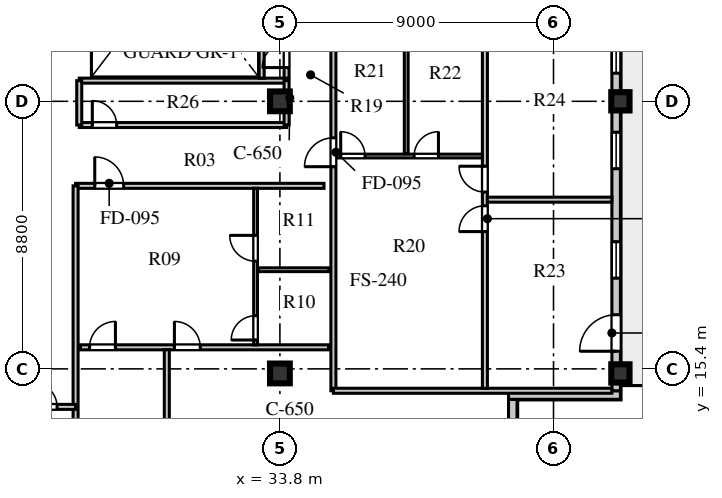
"""IFC4 building model, lengths in metres.
Left out: names, types, materials, properties, quantities, classifications, styles, units other than length and angle.
Written with IfcOpenShell. Run it as: python <this file> out.ifc"""

import sys

from ifc_helpers import new_model, si_unit, direction, frame, frame_2d, origin, origin_2d, place, context, subcontext, project, spatial, rectangle, extrude, element, fill, save


model = new_model("IFC4")
c1 = context("Model", 3, precision=1e-05, world=origin(), true_north=direction((0.0, 1.0)))
c2 = subcontext(c1, "Body", "Model", "MODEL_VIEW")
j1 = project(units=[si_unit("LENGTHUNIT", "METRE"), si_unit("PLANEANGLEUNIT", "RADIAN")], contexts=[c1])
p1 = place(None, origin())
s1 = spatial("IfcSite", under=j1, at=p1, CompositionType="ELEMENT")
p2 = place(p1, origin())
s2 = spatial("IfcBuilding", under=s1, at=p2, CompositionType="ELEMENT")
p3 = place(p2, frame((0.0, 0.0, 327.7)))
s3 = spatial("IfcBuildingStorey", under=s2, at=p3, CompositionType="ELEMENT", Elevation=327.7)
for number, where, z_axis, x_axis in (
    (1, (33.8, 15.25, 0.0), (0.0, 0.0, 1.0), (1.0, 0.0, 0.0)),
    (2, (33.8, 24.2, 0.0), (0.0, 0.0, 1.0), (1.0, 0.0, 0.0)),
):
    element("IfcColumn", number, at=place(p3, frame(where, z_axis=z_axis, x_axis=x_axis)), inside=s3, PredefinedType="COLUMN", context=c2, shape_type="SweptSolid", body=[
        extrude(rectangle(XDim=0.65, YDim=0.65, at=origin_2d()), origin(), (0.0, 0.0, 1.0), 3.56),
    ])
for number, where, z_axis, x_axis in (
    (3, (45.0, 15.25, 0.0), (0.0, 0.0, 1.0), (1.0, 0.0, 0.0)),
    (4, (45.0, 24.2, 0.0), (0.0, 0.0, 1.0), (1.0, 0.0, 0.0)),
):
    element("IfcColumn", number, at=place(p3, frame(where, z_axis=z_axis, x_axis=x_axis)), inside=s3, PredefinedType="COLUMN", context=c2, shape_type="SweptSolid", body=[
        extrude(rectangle(XDim=0.6, YDim=0.6, at=origin_2d()), origin(), (0.0, 0.0, 1.0), 3.56),
    ])
p4 = place(p3, frame((41.46, 11.28, 0.0), z_axis=(0.0, 0.0, 1.0), x_axis=(0.0, 1.0, 0.0)))
e5 = element("IfcWall", 5, at=p4, inside=s3, PredefinedType="STANDARD", context=c2, shape_type="SweptSolid", body=[
    extrude(rectangle(XDim=3.12, YDim=0.28, at=frame_2d((1.56, 0.0))), origin(), (0.0, 0.0, 1.0), 2.92),
])
p5 = place(p3, frame((41.32, 14.54, 0.0), z_axis=(0.0, 0.0, 1.0), x_axis=(1.0, 0.0, 0.0)))
e6 = element("IfcWall", 6, at=p5, inside=s3, PredefinedType="STANDARD", context=c2, shape_type="SweptSolid", body=[
    extrude(rectangle(XDim=3.68, YDim=0.28, at=frame_2d((1.84, 0.0))), origin(), (0.0, 0.0, 1.0), 2.92),
])
p6 = place(p3, frame((44.86, 14.68, 0.0), z_axis=(0.0, 0.0, 1.0), x_axis=(0.0, 1.0, 0.0)))
e7 = element("IfcWall", 7, at=p6, inside=s3, PredefinedType="STANDARD", context=c2, shape_type="SweptSolid", body=[
    extrude(rectangle(XDim=27.84, YDim=0.28, at=frame_2d((13.92, 0.0))), origin(), (0.0, 0.0, 1.0), 2.92),
])
p7 = place(p6, frame((1.3, 0.0, 0.0)))
e8 = element("IfcOpeningElement", 8, at=p7, cuts=e7, PredefinedType="OPENING", context=c2, shape_type="SweptSolid", body=[
    extrude(rectangle(XDim=1.2, YDim=2.05, at=frame_2d((0.6, 1.025))), frame((0.0, 0.15, 0.0), z_axis=(0.0, -1.0, 0.0), x_axis=(1.0, 0.0, 0.0)), (0.0, 0.0, 1.0), 0.3),
])
p8 = place(p6, frame((3.703, 0.0, 0.8)))
e9 = element("IfcOpeningElement", 9, at=p8, cuts=e7, PredefinedType="OPENING", context=c2, shape_type="SweptSolid", body=[
    extrude(rectangle(XDim=1.2, YDim=1.75, at=frame_2d((0.6, 0.875))), frame((0.0, 0.15, 0.0), z_axis=(0.0, -1.0, 0.0), x_axis=(1.0, 0.0, 0.0)), (0.0, 0.0, 1.0), 0.3),
])
p9 = place(p6, frame((7.303, 0.0, 0.8)))
e10 = element("IfcOpeningElement", 10, at=p9, cuts=e7, PredefinedType="OPENING", context=c2, shape_type="SweptSolid", body=[
    extrude(rectangle(XDim=1.2, YDim=1.75, at=frame_2d((0.6, 0.875))), frame((0.0, 0.15, 0.0), z_axis=(0.0, -1.0, 0.0), x_axis=(1.0, 0.0, 0.0)), (0.0, 0.0, 1.0), 0.3),
])
p10 = place(p6, frame((10.445, 0.0, 0.8)))
e11 = element("IfcOpeningElement", 11, at=p10, cuts=e7, PredefinedType="OPENING", context=c2, shape_type="SweptSolid", body=[
    extrude(rectangle(XDim=1.2, YDim=1.75, at=frame_2d((0.6, 0.875))), frame((0.0, 0.15, 0.0), z_axis=(0.0, -1.0, 0.0), x_axis=(1.0, 0.0, 0.0)), (0.0, 0.0, 1.0), 0.3),
])
p11 = place(p6, frame((15.575, 0.0, 0.8)))
e12 = element("IfcOpeningElement", 12, at=p11, cuts=e7, PredefinedType="OPENING", context=c2, shape_type="SweptSolid", body=[
    extrude(rectangle(XDim=1.35, YDim=1.9, at=frame_2d((0.675, 0.95))), frame((0.0, 0.15, 0.0), z_axis=(0.0, -1.0, 0.0), x_axis=(1.0, 0.0, 0.0)), (0.0, 0.0, 1.0), 0.3),
])
p12 = place(p6, frame((21.97, 0.0, 0.8)))
e13 = element("IfcOpeningElement", 13, at=p12, cuts=e7, PredefinedType="OPENING", context=c2, shape_type="SweptSolid", body=[
    extrude(rectangle(XDim=1.65, YDim=1.95, at=frame_2d((0.825, 0.975))), frame((0.0, 0.15, 0.0), z_axis=(0.0, -1.0, 0.0), x_axis=(1.0, 0.0, 0.0)), (0.0, 0.0, 1.0), 0.3),
])
p13 = place(p3, frame((27.08, 21.42, 0.0), z_axis=(0.0, 0.0, 1.0), x_axis=(1.0, 0.0, 0.0)))
e14 = element("IfcWall", 14, at=p13, inside=s3, PredefinedType="PARTITIONING", context=c2, shape_type="SweptSolid", body=[
    extrude(rectangle(XDim=8.17, YDim=0.165, at=frame_2d((4.085, 0.0))), origin(), (0.0, 0.0, 1.0), 3.26),
])
p14 = place(p13, frame((0.63, 0.0, 0.0)))
e15 = element("IfcOpeningElement", 15, at=p14, cuts=e14, PredefinedType="OPENING", context=c2, shape_type="SweptSolid", body=[
    extrude(rectangle(XDim=0.95, YDim=2.1, at=frame_2d((0.475, 1.05))), frame((0.0, 0.093, 0.0), z_axis=(0.0, -1.0, 0.0), x_axis=(1.0, 0.0, 0.0)), (0.0, 0.0, 1.0), 0.185),
])
p15 = place(p3, frame((27.08, 11.28, 0.0), z_axis=(0.0, 0.0, 1.0), x_axis=(0.0, 1.0, 0.0)))
e16 = element("IfcWall", 16, at=p15, inside=s3, PredefinedType="PARTITIONING", context=c2, shape_type="SweptSolid", body=[
    extrude(rectangle(XDim=10.14, YDim=0.165, at=frame_2d((5.07, 0.0))), origin(), (0.0, 0.0, 1.0), 3.56),
])
p16 = place(p3, frame((27.24, 16.109, 0.0), z_axis=(0.0, 0.0, 1.0), x_axis=(1.0, 0.0, 0.0)))
e17 = element("IfcWall", 17, at=p16, inside=s3, PredefinedType="PARTITIONING", context=c2, shape_type="SweptSolid", body=[
    extrude(rectangle(XDim=8.16, YDim=0.165, at=frame_2d((4.08, 0.0))), origin(), (0.0, 0.0, 1.0), 3.56),
])
p17 = place(p16, frame((0.3, 0.0, 0.0)))
e18 = element("IfcOpeningElement", 18, at=p17, cuts=e17, PredefinedType="OPENING", context=c2, shape_type="SweptSolid", body=[
    extrude(rectangle(XDim=0.85, YDim=2.08, at=frame_2d((0.425, 1.04))), frame((0.0, 0.093, 0.0), z_axis=(0.0, -1.0, 0.0), x_axis=(1.0, 0.0, 0.0)), (0.0, 0.0, 1.0), 0.185),
])
p18 = place(p16, frame((3.09, 0.0, 0.0)))
e19 = element("IfcOpeningElement", 19, at=p18, cuts=e17, PredefinedType="OPENING", context=c2, shape_type="SweptSolid", body=[
    extrude(rectangle(XDim=0.85, YDim=2.08, at=frame_2d((0.425, 1.04))), frame((0.0, 0.093, 0.0), z_axis=(0.0, -1.0, 0.0), x_axis=(1.0, 0.0, 0.0)), (0.0, 0.0, 1.0), 0.185),
])
p19 = place(p3, frame((33.0, 16.189, 0.0), z_axis=(0.0, 0.0, 1.0), x_axis=(0.0, 1.0, 0.0)))
e20 = element("IfcWall", 20, at=p19, inside=s3, PredefinedType="PLUMBINGWALL", context=c2, shape_type="SweptSolid", body=[
    extrude(rectangle(XDim=5.151, YDim=0.125, at=frame_2d((2.576, 0.0))), origin(), (0.0, 0.0, 1.0), 3.56),
])
p20 = place(p19, frame((0.16, 0.0, 0.0)))
e21 = element("IfcOpeningElement", 21, at=p20, cuts=e20, PredefinedType="OPENING", context=c2, shape_type="SweptSolid", body=[
    extrude(rectangle(XDim=0.8, YDim=2.05, at=frame_2d((0.4, 1.025))), frame((0.0, 0.073, 0.0), z_axis=(0.0, -1.0, 0.0), x_axis=(1.0, 0.0, 0.0)), (0.0, 0.0, 1.0), 0.145),
])
p21 = place(p19, frame((2.752, 0.0, 0.0)))
e22 = element("IfcOpeningElement", 22, at=p21, cuts=e20, PredefinedType="OPENING", context=c2, shape_type="SweptSolid", body=[
    extrude(rectangle(XDim=0.85, YDim=2.08, at=frame_2d((0.425, 1.04))), frame((0.0, 0.073, 0.0), z_axis=(0.0, -1.0, 0.0), x_axis=(1.0, 0.0, 0.0)), (0.0, 0.0, 1.0), 0.145),
])
p22 = place(p3, frame((33.08, 18.661, 0.0), z_axis=(0.0, 0.0, 1.0), x_axis=(1.0, 0.0, 0.0)))
e23 = element("IfcWall", 23, at=p22, inside=s3, PredefinedType="PLUMBINGWALL", context=c2, shape_type="SweptSolid", body=[
    extrude(rectangle(XDim=2.32, YDim=0.125, at=frame_2d((1.16, 0.0))), origin(), (0.0, 0.0, 1.0), 3.56),
])
p23 = place(p3, frame((30.08, 11.28, 0.0), z_axis=(0.0, 0.0, 1.0), x_axis=(0.0, 1.0, 0.0)))
e24 = element("IfcWall", 24, at=p23, inside=s3, PredefinedType="PARTITIONING", context=c2, shape_type="SweptSolid", body=[
    extrude(rectangle(XDim=4.749, YDim=0.165, at=frame_2d((2.375, 0.0))), origin(), (0.0, 0.0, 1.0), 3.56),
])
p24 = place(p3, frame((35.56, 14.68, 0.0), z_axis=(0.0, 0.0, 1.0), x_axis=(0.0, 1.0, 0.0)))
e25 = element("IfcWall", 25, at=p24, inside=s3, PredefinedType="PARTITIONING", context=c2, shape_type="SweptSolid", body=[
    extrude(rectangle(XDim=12.57, YDim=0.165, at=frame_2d((6.285, 0.0))), origin(), (0.0, 0.0, 1.0), 3.56),
])
p25 = place(p24, frame((7.37, 0.0, 0.0)))
e26 = element("IfcOpeningElement", 26, at=p25, cuts=e25, PredefinedType="OPENING", context=c2, shape_type="SweptSolid", body=[
    extrude(rectangle(XDim=0.95, YDim=2.1, at=frame_2d((0.475, 1.05))), frame((0.0, 0.093, 0.0), z_axis=(0.0, -1.0, 0.0), x_axis=(1.0, 0.0, 0.0)), (0.0, 0.0, 1.0), 0.185),
])
p26 = place(p3, frame((35.56, 14.68, 0.0), z_axis=(0.0, 0.0, 1.0), x_axis=(1.0, 0.0, 0.0)))
e27 = element("IfcWall", 27, at=p26, inside=s3, PredefinedType="PARTITIONING", context=c2, shape_type="SweptSolid", body=[
    extrude(rectangle(XDim=9.16, YDim=0.165, at=frame_2d((4.58, 0.0))), origin(), (0.0, 0.0, 1.0), 3.56),
])
p27 = place(p3, frame((40.543, 14.76, 0.0), z_axis=(0.0, 0.0, 1.0), x_axis=(0.0, 1.0, 0.0)))
e28 = element("IfcWall", 28, at=p27, inside=s3, PredefinedType="PARTITIONING", context=c2, shape_type="SweptSolid", body=[
    extrude(rectangle(XDim=12.41, YDim=0.165, at=frame_2d((6.205, 0.0))), origin(), (0.0, 0.0, 1.0), 3.56),
])
p28 = place(p27, frame((5.155, 0.0, 0.0)))
e29 = element("IfcOpeningElement", 29, at=p28, cuts=e28, PredefinedType="OPENING", context=c2, shape_type="SweptSolid", body=[
    extrude(rectangle(XDim=0.85, YDim=2.08, at=frame_2d((0.425, 1.04))), frame((0.0, 0.093, 0.0), z_axis=(0.0, -1.0, 0.0), x_axis=(1.0, 0.0, 0.0)), (0.0, 0.0, 1.0), 0.185),
])
p29 = place(p27, frame((6.455, 0.0, 0.0)))
e30 = element("IfcOpeningElement", 30, at=p29, cuts=e28, PredefinedType="OPENING", context=c2, shape_type="SweptSolid", body=[
    extrude(rectangle(XDim=0.85, YDim=2.08, at=frame_2d((0.425, 1.04))), frame((0.0, 0.093, 0.0), z_axis=(0.0, -1.0, 0.0), x_axis=(1.0, 0.0, 0.0)), (0.0, 0.0, 1.0), 0.185),
])
p30 = place(p3, frame((35.64, 22.4, 0.0), z_axis=(0.0, 0.0, 1.0), x_axis=(1.0, 0.0, 0.0)))
e31 = element("IfcWall", 31, at=p30, inside=s3, PredefinedType="PLUMBINGWALL", context=c2, shape_type="SweptSolid", body=[
    extrude(rectangle(XDim=4.823, YDim=0.125, at=frame_2d((2.412, 0.0))), origin(), (0.0, 0.0, 1.0), 3.56),
])
p31 = place(p30, frame((0.16, 0.0, 0.0)))
e32 = element("IfcOpeningElement", 32, at=p31, cuts=e31, PredefinedType="OPENING", context=c2, shape_type="SweptSolid", body=[
    extrude(rectangle(XDim=0.8, YDim=2.05, at=frame_2d((0.4, 1.025))), frame((0.0, 0.073, 0.0), z_axis=(0.0, -1.0, 0.0), x_axis=(1.0, 0.0, 0.0)), (0.0, 0.0, 1.0), 0.145),
])
p32 = place(p30, frame((2.575, 0.0, 0.0)))
e33 = element("IfcOpeningElement", 33, at=p32, cuts=e31, PredefinedType="OPENING", context=c2, shape_type="SweptSolid", body=[
    extrude(rectangle(XDim=0.8, YDim=2.05, at=frame_2d((0.4, 1.025))), frame((0.0, 0.073, 0.0), z_axis=(0.0, -1.0, 0.0), x_axis=(1.0, 0.0, 0.0)), (0.0, 0.0, 1.0), 0.145),
])
p33 = place(p3, frame((37.955, 22.48, 0.0), z_axis=(0.0, 0.0, 1.0), x_axis=(0.0, 1.0, 0.0)))
e34 = element("IfcWall", 34, at=p33, inside=s3, PredefinedType="PLUMBINGWALL", context=c2, shape_type="SweptSolid", body=[
    extrude(rectangle(XDim=4.69, YDim=0.125, at=frame_2d((2.345, 0.0))), origin(), (0.0, 0.0, 1.0), 3.56),
])
p34 = place(p3, frame((40.623, 20.965, 0.0), z_axis=(0.0, 0.0, 1.0), x_axis=(1.0, 0.0, 0.0)))
e35 = element("IfcWall", 35, at=p34, inside=s3, PredefinedType="PARTITIONING", context=c2, shape_type="SweptSolid", body=[
    extrude(rectangle(XDim=4.097, YDim=0.165, at=frame_2d((2.048, 0.0))), origin(), (0.0, 0.0, 1.0), 3.56),
])
p35 = place(p3, frame((27.2, 23.42, 0.0), z_axis=(0.0, 0.0, 1.0), x_axis=(1.0, 0.0, 0.0)))
e36 = element("IfcWall", 36, at=p35, inside=s3, PredefinedType="PARTITIONING", context=c2, shape_type="SweptSolid", body=[
    extrude(rectangle(XDim=6.82, YDim=0.165, at=frame_2d((3.41, 0.0))), origin(), (0.0, 0.0, 1.0), 3.56),
])
p36 = place(p35, frame((0.43, 0.0, 0.0)))
e37 = element("IfcOpeningElement", 37, at=p36, cuts=e36, PredefinedType="OPENING", context=c2, shape_type="SweptSolid", body=[
    extrude(rectangle(XDim=0.8, YDim=2.05, at=frame_2d((0.4, 1.025))), frame((0.0, 0.093, 0.0), z_axis=(0.0, -1.0, 0.0), x_axis=(1.0, 0.0, 0.0)), (0.0, 0.0, 1.0), 0.185),
])
p37 = place(p3, frame((27.2, 24.88, 0.0), z_axis=(0.0, 0.0, 1.0), x_axis=(1.0, 0.0, 0.0)))
e38 = element("IfcWall", 38, at=p37, inside=s3, PredefinedType="PARTITIONING", context=c2, shape_type="SweptSolid", body=[
    extrude(rectangle(XDim=6.82, YDim=0.165, at=frame_2d((3.41, 0.0))), origin(), (0.0, 0.0, 1.0), 3.01),
])
p38 = place(p3, frame((27.2, 23.42, 0.0), z_axis=(0.0, 0.0, 1.0), x_axis=(0.0, 1.0, 0.0)))
e39 = element("IfcWall", 39, at=p38, inside=s3, PredefinedType="PARTITIONING", context=c2, shape_type="SweptSolid", body=[
    extrude(rectangle(XDim=1.46, YDim=0.165, at=frame_2d((0.73, 0.0))), origin(), (0.0, 0.0, 1.0), 3.56),
])
p39 = place(p3, frame((34.02, 23.42, 0.0), z_axis=(0.0, 0.0, 1.0), x_axis=(0.0, 1.0, 0.0)))
e40 = element("IfcWall", 40, at=p39, inside=s3, PredefinedType="PARTITIONING", context=c2, shape_type="SweptSolid", body=[
    extrude(rectangle(XDim=1.46, YDim=0.165, at=frame_2d((0.73, 0.0))), origin(), (0.0, 0.0, 1.0), 2.96),
])
p40 = place(p3, frame((33.2, 24.96, 0.0), z_axis=(0.0, 0.0, 1.0), x_axis=(0.0, 1.0, 0.0)))
e41 = element("IfcWall", 41, at=p40, inside=s3, PredefinedType="PARTITIONING", context=c2, shape_type="SweptSolid", body=[
    extrude(rectangle(XDim=2.29, YDim=0.165, at=frame_2d((1.145, 0.0))), origin(), (0.0, 0.0, 1.0), 3.01),
])
p41 = place(p3, frame((34.02, 24.96, 0.0), z_axis=(0.0, 0.0, 1.0), x_axis=(0.0, 1.0, 0.0)))
e42 = element("IfcWall", 42, at=p41, inside=s3, PredefinedType="PARTITIONING", context=c2, shape_type="SweptSolid", body=[
    extrude(rectangle(XDim=2.29, YDim=0.165, at=frame_2d((1.145, 0.0))), origin(), (0.0, 0.0, 1.0), 2.96),
])
p42 = place(p41, frame((0.35, 0.0, 0.0)))
e43 = element("IfcOpeningElement", 43, at=p42, cuts=e42, PredefinedType="OPENING", context=c2, shape_type="SweptSolid", body=[
    extrude(rectangle(XDim=0.8, YDim=2.05, at=frame_2d((0.4, 1.025))), frame((0.0, 0.093, 0.0), z_axis=(0.0, -1.0, 0.0), x_axis=(1.0, 0.0, 0.0)), (0.0, 0.0, 1.0), 0.185),
])
p43 = place(p3, frame((25.22, 14.15, 0.0), z_axis=(0.0, 0.0, 1.0), x_axis=(1.0, 0.0, 0.0)))
e44 = element("IfcWall", 44, at=p43, inside=s3, PredefinedType="PARTITIONING", context=c2, shape_type="SweptSolid", body=[
    extrude(rectangle(XDim=1.86, YDim=0.165, at=frame_2d((0.93, 0.0))), origin(), (0.0, 0.0, 1.0), 3.56),
])
p44 = place(p43, frame((0.45, 0.0, 0.0)))
e45 = element("IfcOpeningElement", 45, at=p44, cuts=e44, PredefinedType="OPENING", context=c2, shape_type="SweptSolid", body=[
    extrude(rectangle(XDim=0.8, YDim=2.05, at=frame_2d((0.4, 1.025))), frame((0.0, 0.093, 0.0), z_axis=(0.0, -1.0, 0.0), x_axis=(1.0, 0.0, 0.0)), (0.0, 0.0, 1.0), 0.185),
])
p45 = place(p7, frame((1.2, 0.0, 0.0), z_axis=(0.0, 0.0, 1.0), x_axis=(-1.0, 0.0, 0.0)))
e46 = element("IfcDoor", 46, at=p45, inside=s3, OperationType="SINGLE_SWING_RIGHT", PredefinedType="DOOR", context=c2, shape_type="SweptSolid", body=[
    extrude(rectangle(XDim=1.2, YDim=2.05, at=frame_2d((0.6, 1.025))), frame((0.0, 0.025, 0.0), z_axis=(0.0, -1.0, 0.0), x_axis=(1.0, 0.0, 0.0)), (0.0, 0.0, 1.0), 0.05),
])
fill(e8, e46)
p46 = place(p8, origin())
e47 = element("IfcWindow", 47, at=p46, inside=s3, PartitioningType="SINGLE_PANEL", PredefinedType="WINDOW", context=c2, shape_type="SweptSolid", body=[
    extrude(rectangle(XDim=1.2, YDim=1.75, at=frame_2d((0.6, 0.875))), frame((0.0, 0.03, 0.0), z_axis=(0.0, -1.0, 0.0), x_axis=(1.0, 0.0, 0.0)), (0.0, 0.0, 1.0), 0.06),
])
fill(e9, e47)
p47 = place(p9, origin())
e48 = element("IfcWindow", 48, at=p47, inside=s3, PartitioningType="SINGLE_PANEL", PredefinedType="WINDOW", context=c2, shape_type="SweptSolid", body=[
    extrude(rectangle(XDim=1.2, YDim=1.75, at=frame_2d((0.6, 0.875))), frame((0.0, 0.03, 0.0), z_axis=(0.0, -1.0, 0.0), x_axis=(1.0, 0.0, 0.0)), (0.0, 0.0, 1.0), 0.06),
])
fill(e10, e48)
p48 = place(p10, origin())
e49 = element("IfcWindow", 49, at=p48, inside=s3, PartitioningType="SINGLE_PANEL", PredefinedType="WINDOW", context=c2, shape_type="SweptSolid", body=[
    extrude(rectangle(XDim=1.2, YDim=1.75, at=frame_2d((0.6, 0.875))), frame((0.0, 0.03, 0.0), z_axis=(0.0, -1.0, 0.0), x_axis=(1.0, 0.0, 0.0)), (0.0, 0.0, 1.0), 0.06),
])
fill(e11, e49)
p49 = place(p20, origin())
e50 = element("IfcDoor", 50, at=p49, inside=s3, OperationType="SINGLE_SWING_LEFT", PredefinedType="DOOR", context=c2, shape_type="SweptSolid", body=[
    extrude(rectangle(XDim=0.8, YDim=2.05, at=frame_2d((0.4, 1.025))), frame((0.0, 0.025, 0.0), z_axis=(0.0, -1.0, 0.0), x_axis=(1.0, 0.0, 0.0)), (0.0, 0.0, 1.0), 0.05),
])
fill(e21, e50)
p50 = place(p21, origin())
e51 = element("IfcDoor", 51, at=p50, inside=s3, OperationType="SINGLE_SWING_RIGHT", PredefinedType="DOOR", context=c2, shape_type="SweptSolid", body=[
    extrude(rectangle(XDim=0.85, YDim=2.08, at=frame_2d((0.425, 1.04))), frame((0.0, 0.025, 0.0), z_axis=(0.0, -1.0, 0.0), x_axis=(1.0, 0.0, 0.0)), (0.0, 0.0, 1.0), 0.05),
])
fill(e22, e51)
p51 = place(p17, frame((0.85, 0.0, 0.0), z_axis=(0.0, 0.0, 1.0), x_axis=(-1.0, 0.0, 0.0)))
e52 = element("IfcDoor", 52, at=p51, inside=s3, OperationType="SINGLE_SWING_LEFT", PredefinedType="DOOR", context=c2, shape_type="SweptSolid", body=[
    extrude(rectangle(XDim=0.85, YDim=2.08, at=frame_2d((0.425, 1.04))), frame((0.0, 0.025, 0.0), z_axis=(0.0, -1.0, 0.0), x_axis=(1.0, 0.0, 0.0)), (0.0, 0.0, 1.0), 0.05),
])
fill(e18, e52)
p52 = place(p18, frame((0.85, 0.0, 0.0), z_axis=(0.0, 0.0, 1.0), x_axis=(-1.0, 0.0, 0.0)))
e53 = element("IfcDoor", 53, at=p52, inside=s3, OperationType="SINGLE_SWING_RIGHT", PredefinedType="DOOR", context=c2, shape_type="SweptSolid", body=[
    extrude(rectangle(XDim=0.85, YDim=2.08, at=frame_2d((0.425, 1.04))), frame((0.0, 0.025, 0.0), z_axis=(0.0, -1.0, 0.0), x_axis=(1.0, 0.0, 0.0)), (0.0, 0.0, 1.0), 0.05),
])
fill(e19, e53)
p53 = place(p14, frame((0.95, 0.0, 0.0), z_axis=(0.0, 0.0, 1.0), x_axis=(-1.0, 0.0, 0.0)))
e54 = element("IfcDoor", 54, at=p53, inside=s3, OperationType="SINGLE_SWING_RIGHT", PredefinedType="DOOR", context=c2, shape_type="SweptSolid", body=[
    extrude(rectangle(XDim=0.95, YDim=2.1, at=frame_2d((0.475, 1.05))), frame((0.0, 0.025, 0.0), z_axis=(0.0, -1.0, 0.0), x_axis=(1.0, 0.0, 0.0)), (0.0, 0.0, 1.0), 0.05),
])
fill(e15, e54)
p54 = place(p31, origin())
e55 = element("IfcDoor", 55, at=p54, inside=s3, OperationType="SINGLE_SWING_LEFT", PredefinedType="DOOR", context=c2, shape_type="SweptSolid", body=[
    extrude(rectangle(XDim=0.8, YDim=2.05, at=frame_2d((0.4, 1.025))), frame((0.0, 0.025, 0.0), z_axis=(0.0, -1.0, 0.0), x_axis=(1.0, 0.0, 0.0)), (0.0, 0.0, 1.0), 0.05),
])
fill(e32, e55)
p55 = place(p32, origin())
e56 = element("IfcDoor", 56, at=p55, inside=s3, OperationType="SINGLE_SWING_RIGHT", PredefinedType="DOOR", context=c2, shape_type="SweptSolid", body=[
    extrude(rectangle(XDim=0.8, YDim=2.05, at=frame_2d((0.4, 1.025))), frame((0.0, 0.025, 0.0), z_axis=(0.0, -1.0, 0.0), x_axis=(1.0, 0.0, 0.0)), (0.0, 0.0, 1.0), 0.05),
])
fill(e33, e56)
p56 = place(p28, origin())
e57 = element("IfcDoor", 57, at=p56, inside=s3, OperationType="SINGLE_SWING_LEFT", PredefinedType="DOOR", context=c2, shape_type="SweptSolid", body=[
    extrude(rectangle(XDim=0.85, YDim=2.08, at=frame_2d((0.425, 1.04))), frame((0.0, 0.025, 0.0), z_axis=(0.0, -1.0, 0.0), x_axis=(1.0, 0.0, 0.0)), (0.0, 0.0, 1.0), 0.05),
])
fill(e29, e57)
p57 = place(p29, origin())
e58 = element("IfcDoor", 58, at=p57, inside=s3, OperationType="SINGLE_SWING_RIGHT", PredefinedType="DOOR", context=c2, shape_type="SweptSolid", body=[
    extrude(rectangle(XDim=0.85, YDim=2.08, at=frame_2d((0.425, 1.04))), frame((0.0, 0.025, 0.0), z_axis=(0.0, -1.0, 0.0), x_axis=(1.0, 0.0, 0.0)), (0.0, 0.0, 1.0), 0.05),
])
fill(e30, e58)
p58 = place(p25, origin())
e59 = element("IfcDoor", 59, at=p58, inside=s3, OperationType="SINGLE_SWING_LEFT", PredefinedType="DOOR", context=c2, shape_type="SweptSolid", body=[
    extrude(rectangle(XDim=0.95, YDim=2.1, at=frame_2d((0.475, 1.05))), frame((0.0, 0.025, 0.0), z_axis=(0.0, -1.0, 0.0), x_axis=(1.0, 0.0, 0.0)), (0.0, 0.0, 1.0), 0.05),
])
fill(e26, e59)
p59 = place(p36, origin())
e60 = element("IfcDoor", 60, at=p59, inside=s3, OperationType="SINGLE_SWING_LEFT", PredefinedType="DOOR", context=c2, shape_type="SweptSolid", body=[
    extrude(rectangle(XDim=0.8, YDim=2.05, at=frame_2d((0.4, 1.025))), frame((0.0, 0.025, 0.0), z_axis=(0.0, -1.0, 0.0), x_axis=(1.0, 0.0, 0.0)), (0.0, 0.0, 1.0), 0.05),
])
fill(e37, e60)
p60 = place(p42, origin())
e61 = element("IfcDoor", 61, at=p60, inside=s3, OperationType="SINGLE_SWING_LEFT", PredefinedType="DOOR", context=c2, shape_type="SweptSolid", body=[
    extrude(rectangle(XDim=0.8, YDim=2.05, at=frame_2d((0.4, 1.025))), frame((0.0, 0.025, 0.0), z_axis=(0.0, -1.0, 0.0), x_axis=(1.0, 0.0, 0.0)), (0.0, 0.0, 1.0), 0.05),
])
fill(e43, e61)
p61 = place(p44, origin())
e62 = element("IfcDoor", 62, at=p61, inside=s3, OperationType="SINGLE_SWING_LEFT", PredefinedType="DOOR", context=c2, shape_type="SweptSolid", body=[
    extrude(rectangle(XDim=0.8, YDim=2.05, at=frame_2d((0.4, 1.025))), frame((0.0, 0.025, 0.0), z_axis=(0.0, -1.0, 0.0), x_axis=(1.0, 0.0, 0.0)), (0.0, 0.0, 1.0), 0.05),
])
fill(e45, e62)
save(model, sys.argv[1])
